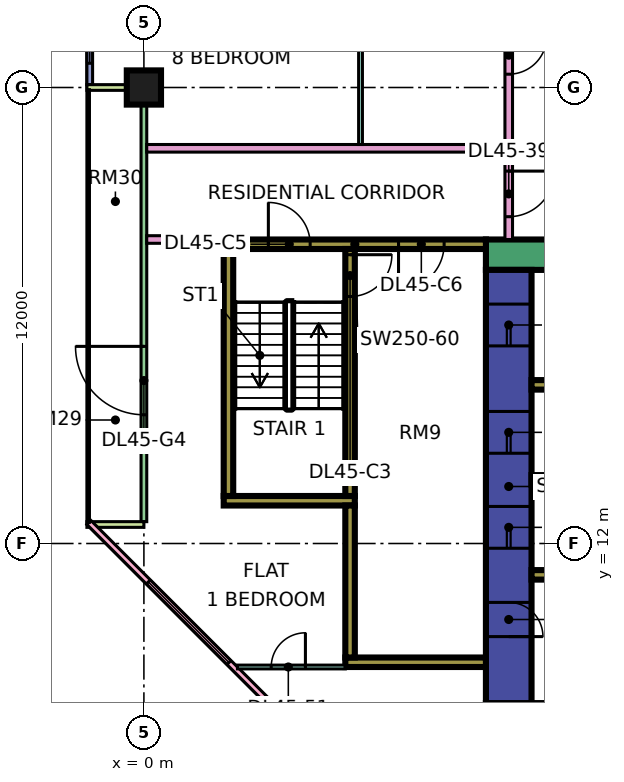
"""IFC4 building model, lengths in metres.
Left out: names, types, materials, properties, quantities, classifications, styles, units other than length and angle.
Written with IfcOpenShell. Run it as: python <this file> out.ifc"""

import sys

from ifc_helpers import new_model, si_unit, direction, frame, frame_2d, origin, origin_2d, place, context, subcontext, project, spatial, rectangle, extrude, element, fill, save


model = new_model("IFC4")
c1 = context("Model", 3, precision=1e-05, world=origin(), true_north=direction((0.0, 1.0)))
c2 = subcontext(c1, "Body", "Model", "MODEL_VIEW")
j1 = project(units=[si_unit("LENGTHUNIT", "METRE"), si_unit("PLANEANGLEUNIT", "RADIAN")], contexts=[c1])
p1 = place(None, origin())
s1 = spatial("IfcSite", under=j1, at=p1, CompositionType="ELEMENT")
p2 = place(p1, origin())
s2 = spatial("IfcBuilding", under=s1, at=p2, CompositionType="ELEMENT")
p3 = place(p2, frame((0.0, 0.0, 194.9)))
s3 = spatial("IfcBuildingStorey", under=s2, at=p3, CompositionType="ELEMENT", Elevation=194.9)
p4 = place(p3, frame((0.0, 24.0, 0.0), z_axis=(0.0, 0.0, 1.0), x_axis=(1.0, 0.0, 0.0)))
e1 = element("IfcColumn", 1, at=p4, inside=s3, PredefinedType="COLUMN", context=c2, shape_type="SweptSolid", body=[
    extrude(rectangle(XDim=0.9, YDim=0.9, at=origin_2d()), origin(), (0.0, 0.0, 1.0), 3.75),
])
p5 = place(p3, frame((9.0, 19.6, 0.0), z_axis=(0.0, 0.0, 1.0), x_axis=(1.0, 0.0, 0.0)))
e2 = element("IfcWall", 2, at=p5, inside=s3, PredefinedType="SHEAR", context=c2, shape_type="SweptSolid", body=[
    extrude(rectangle(XDim=25.0, YDim=0.8, at=frame_2d((12.5, 0.0))), origin(), (0.0, 0.0, 1.0), 3.75),
])
p6 = place(p5, frame((19.1, 0.0, 0.0)))
e3 = element("IfcOpeningElement", 3, at=p6, cuts=e2, PredefinedType="OPENING", context=c2, shape_type="SweptSolid", body=[
    extrude(rectangle(XDim=1.8, YDim=2.4, at=frame_2d((0.9, 1.2))), frame((0.0, 0.41, 0.0), z_axis=(0.0, -1.0, 0.0), x_axis=(1.0, 0.0, 0.0)), (0.0, 0.0, 1.0), 0.82),
])
p7 = place(p3, frame((9.6, 7.8, 0.0), z_axis=(0.0, 0.0, 1.0), x_axis=(0.0, 1.0, 0.0)))
e4 = element("IfcWall", 4, at=p7, inside=s3, PredefinedType="SHEAR", context=c2, shape_type="SweptSolid", body=[
    extrude(rectangle(XDim=11.4, YDim=1.2, at=frame_2d((5.7, 0.0))), origin(), (0.0, 0.0, 1.0), 3.75),
])
p8 = place(p7, frame((4.075, 0.0, 0.0)))
e5 = element("IfcOpeningElement", 5, at=p8, cuts=e4, PredefinedType="OPENING", context=c2, shape_type="SweptSolid", body=[
    extrude(rectangle(XDim=1.1, YDim=2.2, at=frame_2d((0.55, 1.1))), frame((0.0, 0.61, 0.0), z_axis=(0.0, -1.0, 0.0), x_axis=(1.0, 0.0, 0.0)), (0.0, 0.0, 1.0), 1.22),
])
p9 = place(p7, frame((6.575, 0.0, 0.0)))
e6 = element("IfcOpeningElement", 6, at=p9, cuts=e4, PredefinedType="OPENING", context=c2, shape_type="SweptSolid", body=[
    extrude(rectangle(XDim=1.1, YDim=2.2, at=frame_2d((0.55, 1.1))), frame((0.0, 0.61, 0.0), z_axis=(0.0, -1.0, 0.0), x_axis=(1.0, 0.0, 0.0)), (0.0, 0.0, 1.0), 1.22),
])
p10 = place(p7, frame((9.4, 0.0, 0.0)))
e7 = element("IfcOpeningElement", 7, at=p10, cuts=e4, PredefinedType="OPENING", context=c2, shape_type="SweptSolid", body=[
    extrude(rectangle(XDim=1.1, YDim=2.2, at=frame_2d((0.55, 1.1))), frame((0.0, 0.61, 0.0), z_axis=(0.0, -1.0, 0.0), x_axis=(1.0, 0.0, 0.0)), (0.0, 0.0, 1.0), 1.22),
])
p11 = place(p7, frame((1.75, 0.0, 0.0)))
e8 = element("IfcOpeningElement", 8, at=p11, cuts=e4, PredefinedType="OPENING", context=c2, shape_type="SweptSolid", body=[
    extrude(rectangle(XDim=0.9, YDim=2.1, at=frame_2d((0.45, 1.05))), frame((0.0, 0.61, 0.0), z_axis=(0.0, -1.0, 0.0), x_axis=(1.0, 0.0, 0.0)), (0.0, 0.0, 1.0), 1.22),
])
for number, where, z_axis, x_axis in (
    (9, (10.2, 11.175, 0.0), (0.0, 0.0, 1.0), (1.0, 0.0, 0.0)),
    (10, (10.2, 13.675, 0.0), (0.0, 0.0, 1.0), (1.0, 0.0, 0.0)),
    (11, (10.2, 16.175, 0.0), (0.0, 0.0, 1.0), (1.0, 0.0, 0.0)),
):
    element("IfcWall", number, at=place(p3, frame(where, z_axis=z_axis, x_axis=x_axis)), inside=s3, PredefinedType="SHEAR", context=c2, shape_type="SweptSolid", body=[
        extrude(rectangle(XDim=3.0, YDim=0.25, at=frame_2d((1.5, 0.0))), origin(), (0.0, 0.0, 1.0), 3.75),
    ])
p12 = place(p3, frame((2.1, 19.875, 0.0), z_axis=(0.0, 0.0, 1.0), x_axis=(1.0, 0.0, 0.0)))
e12 = element("IfcWall", 12, at=p12, inside=s3, PredefinedType="SHEAR", context=c2, shape_type="SweptSolid", body=[
    extrude(rectangle(XDim=6.9, YDim=0.25, at=frame_2d((3.45, 0.0))), origin(), (0.0, 0.0, 1.0), 3.75),
])
p13 = place(p12, frame((1.175, 0.0, 0.0)))
e13 = element("IfcOpeningElement", 13, at=p13, cuts=e12, PredefinedType="OPENING", context=c2, shape_type="SweptSolid", body=[
    extrude(rectangle(XDim=1.1, YDim=2.2, at=frame_2d((0.55, 1.1))), frame((0.0, 0.135, 0.0), z_axis=(0.0, -1.0, 0.0), x_axis=(1.0, 0.0, 0.0)), (0.0, 0.0, 1.0), 0.27),
])
p14 = place(p12, frame((4.6, 0.0, 0.0)))
e14 = element("IfcOpeningElement", 14, at=p14, cuts=e12, PredefinedType="OPENING", context=c2, shape_type="SweptSolid", body=[
    extrude(rectangle(XDim=1.2, YDim=2.2, at=frame_2d((0.6, 1.1))), frame((0.0, 0.135, 0.0), z_axis=(0.0, -1.0, 0.0), x_axis=(1.0, 0.0, 0.0)), (0.0, 0.0, 1.0), 0.27),
])
p15 = place(p3, frame((2.1, 13.125, 0.0), z_axis=(0.0, 0.0, 1.0), x_axis=(1.0, 0.0, 0.0)))
e15 = element("IfcWall", 15, at=p15, inside=s3, PredefinedType="SHEAR", context=c2, shape_type="SweptSolid", body=[
    extrude(rectangle(XDim=3.45, YDim=0.25, at=frame_2d((1.725, 0.0))), origin(), (0.0, 0.0, 1.0), 3.75),
])
p16 = place(p3, frame((2.225, 13.25, 0.0), z_axis=(0.0, 0.0, 1.0), x_axis=(0.0, 1.0, 0.0)))
e16 = element("IfcWall", 16, at=p16, inside=s3, PredefinedType="SHEAR", context=c2, shape_type="SweptSolid", body=[
    extrude(rectangle(XDim=6.5, YDim=0.25, at=frame_2d((3.25, 0.0))), origin(), (0.0, 0.0, 1.0), 3.75),
])
p17 = place(p3, frame((5.425, 13.25, 0.0), z_axis=(0.0, 0.0, 1.0), x_axis=(0.0, 1.0, 0.0)))
e17 = element("IfcWall", 17, at=p17, inside=s3, PredefinedType="SHEAR", context=c2, shape_type="SweptSolid", body=[
    extrude(rectangle(XDim=6.5, YDim=0.25, at=frame_2d((3.25, 0.0))), origin(), (0.0, 0.0, 1.0), 3.75),
])
p18 = place(p17, frame((5.25, 0.0, 0.0)))
e18 = element("IfcOpeningElement", 18, at=p18, cuts=e17, PredefinedType="OPENING", context=c2, shape_type="SweptSolid", body=[
    extrude(rectangle(XDim=1.1, YDim=2.2, at=frame_2d((0.55, 1.1))), frame((0.0, 0.135, 0.0), z_axis=(0.0, -1.0, 0.0), x_axis=(1.0, 0.0, 0.0)), (0.0, 0.0, 1.0), 0.27),
])
p19 = place(p3, frame((5.3, 8.875, 0.0), z_axis=(0.0, 0.0, 1.0), x_axis=(1.0, 0.0, 0.0)))
e19 = element("IfcWall", 19, at=p19, inside=s3, PredefinedType="SHEAR", context=c2, shape_type="SweptSolid", body=[
    extrude(rectangle(XDim=3.7, YDim=0.25, at=frame_2d((1.85, 0.0))), origin(), (0.0, 0.0, 1.0), 3.75),
])
p20 = place(p3, frame((5.425, 9.0, 0.0), z_axis=(0.0, 0.0, 1.0), x_axis=(0.0, 1.0, 0.0)))
e20 = element("IfcWall", 20, at=p20, inside=s3, PredefinedType="SHEAR", context=c2, shape_type="SweptSolid", body=[
    extrude(rectangle(XDim=4.0, YDim=0.25, at=frame_2d((2.0, 0.0))), origin(), (0.0, 0.0, 1.0), 3.75),
])
p21 = place(p3, frame((-1.425, 35.925, 0.0), z_axis=(0.0, 0.0, 1.0), x_axis=(0.0, -1.0, 0.0)))
e21 = element("IfcWall", 21, at=p21, inside=s3, PredefinedType="SOLIDWALL", context=c2, shape_type="SweptSolid", body=[
    extrude(rectangle(XDim=11.85, YDim=0.15, at=frame_2d((5.925, 0.0))), origin(), (0.0, 0.0, 1.0), 3.35),
])
p22 = place(p21, frame((0.562, 0.0, 0.45)))
e22 = element("IfcOpeningElement", 22, at=p22, cuts=e21, PredefinedType="OPENING", context=c2, shape_type="SweptSolid", body=[
    extrude(rectangle(XDim=1.8, YDim=2.4, at=frame_2d((0.9, 1.2))), frame((0.0, 0.085, 0.0), z_axis=(0.0, -1.0, 0.0), x_axis=(1.0, 0.0, 0.0)), (0.0, 0.0, 1.0), 0.17),
])
p23 = place(p21, frame((3.525, 0.0, 0.45)))
e23 = element("IfcOpeningElement", 23, at=p23, cuts=e21, PredefinedType="OPENING", context=c2, shape_type="SweptSolid", body=[
    extrude(rectangle(XDim=4.8, YDim=2.4, at=frame_2d((2.4, 1.2))), frame((0.0, 0.085, 0.0), z_axis=(0.0, -1.0, 0.0), x_axis=(1.0, 0.0, 0.0)), (0.0, 0.0, 1.0), 0.17),
])
p24 = place(p21, frame((9.488, 0.0, 0.45)))
e24 = element("IfcOpeningElement", 24, at=p24, cuts=e21, PredefinedType="OPENING", context=c2, shape_type="SweptSolid", body=[
    extrude(rectangle(XDim=1.8, YDim=2.4, at=frame_2d((0.9, 1.2))), frame((0.0, 0.085, 0.0), z_axis=(0.0, -1.0, 0.0), x_axis=(1.0, 0.0, 0.0)), (0.0, 0.0, 1.0), 0.17),
])
p25 = place(p3, frame((0.0, 23.925, 0.0), z_axis=(0.0, 0.0, 1.0), x_axis=(0.0, -1.0, 0.0)))
e25 = element("IfcWall", 25, at=p25, inside=s3, PredefinedType="SOLIDWALL", context=c2, shape_type="SweptSolid", body=[
    extrude(rectangle(XDim=11.35, YDim=0.15, at=frame_2d((5.675, 0.0))), origin(), (0.0, 0.0, 1.0), 3.35),
])
p26 = place(p25, frame((6.738, 0.0, 0.0)))
e26 = element("IfcOpeningElement", 26, at=p26, cuts=e25, PredefinedType="OPENING", context=c2, shape_type="SweptSolid", body=[
    extrude(rectangle(XDim=1.8, YDim=2.4, at=frame_2d((0.9, 1.2))), frame((0.0, 0.085, 0.0), z_axis=(0.0, -1.0, 0.0), x_axis=(1.0, 0.0, 0.0)), (0.0, 0.0, 1.0), 0.17),
])
for number, where, z_axis, x_axis in (
    (27, (-1.5, 24.0, 0.0), (0.0, 0.0, 1.0), (1.0, 0.0, 0.0)),
    (28, (-1.5, 12.5, 0.0), (0.0, 0.0, 1.0), (1.0, 0.0, 0.0)),
):
    element("IfcWall", number, at=place(p3, frame(where, z_axis=z_axis, x_axis=x_axis)), inside=s3, PredefinedType="SOLIDWALL", context=c2, shape_type="SweptSolid", body=[
        extrude(rectangle(XDim=1.5, YDim=0.15, at=frame_2d((0.75, 0.0))), origin(), (0.0, 0.0, 1.0), 3.35),
    ])
p27 = place(p3, frame((-1.447, 12.553, 0.0), z_axis=(0.0, 0.0, 1.0), x_axis=(0.707106781187, -0.707106781187, 0.0)))
e29 = element("IfcWall", 29, at=p27, inside=s3, PredefinedType="SOLIDWALL", context=c2, shape_type="SweptSolid", body=[
    extrude(rectangle(XDim=19.799, YDim=0.15, at=frame_2d((9.899, 0.0))), origin(), (0.0, 0.0, 1.0), 3.35),
])
p28 = place(p27, frame((2.212, 0.0, 0.45)))
e30 = element("IfcOpeningElement", 30, at=p28, cuts=e29, PredefinedType="OPENING", context=c2, shape_type="SweptSolid", body=[
    extrude(rectangle(XDim=3.0, YDim=2.4, at=frame_2d((1.5, 1.2))), frame((0.0, 0.085, 0.0), z_axis=(0.0, -1.0, 0.0), x_axis=(1.0, 0.0, 0.0)), (0.0, 0.0, 1.0), 0.17),
])
p29 = place(p27, frame((10.216, 0.0, 0.45)))
e31 = element("IfcOpeningElement", 31, at=p29, cuts=e29, PredefinedType="OPENING", context=c2, shape_type="SweptSolid", body=[
    extrude(rectangle(XDim=3.0, YDim=2.4, at=frame_2d((1.5, 1.2))), frame((0.0, 0.085, 0.0), z_axis=(0.0, -1.0, 0.0), x_axis=(1.0, 0.0, 0.0)), (0.0, 0.0, 1.0), 0.17),
])
p30 = place(p3, frame((0.074, 20.0, 0.0), z_axis=(0.0, 0.0, 1.0), x_axis=(1.0, 0.0, 0.0)))
e32 = element("IfcWall", 32, at=p30, inside=s3, PredefinedType="PARTITIONING", context=c2, shape_type="SweptSolid", body=[
    extrude(rectangle(XDim=2.026, YDim=0.2, at=frame_2d((1.013, 0.0))), origin(), (0.0, 0.0, 1.0), 3.35),
])
p31 = place(p3, frame((0.074, 22.4, 0.0), z_axis=(0.0, 0.0, 1.0), x_axis=(1.0, 0.0, 0.0)))
e33 = element("IfcWall", 33, at=p31, inside=s3, PredefinedType="PARTITIONING", context=c2, shape_type="SweptSolid", body=[
    extrude(rectangle(XDim=9.426, YDim=0.2, at=frame_2d((4.713, 0.0))), origin(), (0.0, 0.0, 1.0), 3.35),
])
p32 = place(p3, frame((2.461, 8.75, 0.0), z_axis=(0.0, 0.0, 1.0), x_axis=(1.0, 0.0, 0.0)))
e34 = element("IfcWall", 34, at=p32, inside=s3, PredefinedType="PARTITIONING", context=c2, shape_type="SweptSolid", body=[
    extrude(rectangle(XDim=2.839, YDim=0.1, at=frame_2d((1.419, 0.0))), origin(), (0.0, 0.0, 1.0), 3.35),
])
p33 = place(p32, frame((0.889, 0.0, 0.0)))
e35 = element("IfcOpeningElement", 35, at=p33, cuts=e34, PredefinedType="OPENING", context=c2, shape_type="SweptSolid", body=[
    extrude(rectangle(XDim=0.9, YDim=2.1, at=frame_2d((0.45, 1.05))), frame((0.0, 0.06, 0.0), z_axis=(0.0, -1.0, 0.0), x_axis=(1.0, 0.0, 0.0)), (0.0, 0.0, 1.0), 0.12),
])
p34 = place(p3, frame((5.7, 22.5, 0.0), z_axis=(0.0, 0.0, 1.0), x_axis=(0.0, 1.0, 0.0)))
e36 = element("IfcWall", 36, at=p34, inside=s3, PredefinedType="PARTITIONING", context=c2, shape_type="SweptSolid", body=[
    extrude(rectangle(XDim=4.45, YDim=0.1, at=frame_2d((2.225, 0.0))), origin(), (0.0, 0.0, 1.0), 3.35),
])
p35 = place(p3, frame((9.6, 20.0, 0.0), z_axis=(0.0, 0.0, 1.0), x_axis=(0.0, 1.0, 0.0)))
e37 = element("IfcWall", 37, at=p35, inside=s3, PredefinedType="PARTITIONING", context=c2, shape_type="SweptSolid", body=[
    extrude(rectangle(XDim=44.35, YDim=0.2, at=frame_2d((22.175, 0.0))), origin(), (0.0, 0.0, 1.0), 3.35),
])
p36 = place(p35, frame((17.1, 0.0, 0.0)))
e38 = element("IfcOpeningElement", 38, at=p36, cuts=e37, PredefinedType="OPENING", context=c2, shape_type="SweptSolid", body=[
    extrude(rectangle(XDim=1.0, YDim=2.1, at=frame_2d((0.5, 1.05))), frame((0.0, 0.11, 0.0), z_axis=(0.0, -1.0, 0.0), x_axis=(1.0, 0.0, 0.0)), (0.0, 0.0, 1.0), 0.22),
])
p37 = place(p35, frame((29.1, 0.0, 0.0)))
e39 = element("IfcOpeningElement", 39, at=p37, cuts=e37, PredefinedType="OPENING", context=c2, shape_type="SweptSolid", body=[
    extrude(rectangle(XDim=1.0, YDim=2.1, at=frame_2d((0.5, 1.05))), frame((0.0, 0.11, 0.0), z_axis=(0.0, -1.0, 0.0), x_axis=(1.0, 0.0, 0.0)), (0.0, 0.0, 1.0), 0.22),
])
p38 = place(p35, frame((0.6, 0.0, 0.0)))
e40 = element("IfcOpeningElement", 40, at=p38, cuts=e37, PredefinedType="OPENING", context=c2, shape_type="SweptSolid", body=[
    extrude(rectangle(XDim=1.2, YDim=2.1, at=frame_2d((0.6, 1.05))), frame((0.0, 0.11, 0.0), z_axis=(0.0, -1.0, 0.0), x_axis=(1.0, 0.0, 0.0)), (0.0, 0.0, 1.0), 0.22),
])
p39 = place(p35, frame((4.35, 0.0, 0.0)))
e41 = element("IfcOpeningElement", 41, at=p39, cuts=e37, PredefinedType="OPENING", context=c2, shape_type="SweptSolid", body=[
    extrude(rectangle(XDim=1.0, YDim=2.1, at=frame_2d((0.5, 1.05))), frame((0.0, 0.11, 0.0), z_axis=(0.0, -1.0, 0.0), x_axis=(1.0, 0.0, 0.0)), (0.0, 0.0, 1.0), 0.22),
])
p40 = place(p24, origin())
e42 = element("IfcWindow", 42, at=p40, inside=s3, PartitioningType="SINGLE_PANEL", PredefinedType="WINDOW", context=c2, shape_type="SweptSolid", body=[
    extrude(rectangle(XDim=1.8, YDim=2.4, at=frame_2d((0.9, 1.2))), frame((0.0, 0.03, 0.0), z_axis=(0.0, -1.0, 0.0), x_axis=(1.0, 0.0, 0.0)), (0.0, 0.0, 1.0), 0.06),
])
fill(e24, e42)
p41 = place(p26, frame((1.8, 0.0, 0.0), z_axis=(0.0, 0.0, 1.0), x_axis=(-1.0, 0.0, 0.0)))
e43 = element("IfcDoor", 43, at=p41, inside=s3, OperationType="DOUBLE_DOOR_SINGLE_SWING", PredefinedType="DOOR", context=c2, shape_type="SweptSolid", body=[
    extrude(rectangle(XDim=1.8, YDim=2.4, at=frame_2d((0.9, 1.2))), frame((0.0, 0.025, 0.0), z_axis=(0.0, -1.0, 0.0), x_axis=(1.0, 0.0, 0.0)), (0.0, 0.0, 1.0), 0.05),
])
fill(e26, e43)
p42 = place(p28, origin())
e44 = element("IfcWindow", 44, at=p42, inside=s3, PartitioningType="SINGLE_PANEL", PredefinedType="WINDOW", context=c2, shape_type="SweptSolid", body=[
    extrude(rectangle(XDim=3.0, YDim=2.4, at=frame_2d((1.5, 1.2))), frame((0.0, 0.03, 0.0), z_axis=(0.0, -1.0, 0.0), x_axis=(1.0, 0.0, 0.0)), (0.0, 0.0, 1.0), 0.06),
])
fill(e30, e44)
p43 = place(p8, origin())
e45 = element("IfcDoor", 45, at=p43, inside=s3, OperationType="DOUBLE_DOOR_SLIDING", PredefinedType="DOOR", context=c2, shape_type="SweptSolid", body=[
    extrude(rectangle(XDim=1.1, YDim=2.2, at=frame_2d((0.55, 1.1))), frame((0.0, 0.025, 0.0), z_axis=(0.0, -1.0, 0.0), x_axis=(1.0, 0.0, 0.0)), (0.0, 0.0, 1.0), 0.05),
])
fill(e5, e45)
p44 = place(p9, origin())
e46 = element("IfcDoor", 46, at=p44, inside=s3, OperationType="DOUBLE_DOOR_SLIDING", PredefinedType="DOOR", context=c2, shape_type="SweptSolid", body=[
    extrude(rectangle(XDim=1.1, YDim=2.2, at=frame_2d((0.55, 1.1))), frame((0.0, 0.025, 0.0), z_axis=(0.0, -1.0, 0.0), x_axis=(1.0, 0.0, 0.0)), (0.0, 0.0, 1.0), 0.05),
])
fill(e6, e46)
p45 = place(p10, origin())
e47 = element("IfcDoor", 47, at=p45, inside=s3, OperationType="DOUBLE_DOOR_SLIDING", PredefinedType="DOOR", context=c2, shape_type="SweptSolid", body=[
    extrude(rectangle(XDim=1.1, YDim=2.2, at=frame_2d((0.55, 1.1))), frame((0.0, 0.025, 0.0), z_axis=(0.0, -1.0, 0.0), x_axis=(1.0, 0.0, 0.0)), (0.0, 0.0, 1.0), 0.05),
])
fill(e7, e47)
p46 = place(p18, origin())
e48 = element("IfcDoor", 48, at=p46, inside=s3, OperationType="SINGLE_SWING_RIGHT", PredefinedType="DOOR", context=c2, shape_type="SweptSolid", body=[
    extrude(rectangle(XDim=1.1, YDim=2.2, at=frame_2d((0.55, 1.1))), frame((0.0, 0.025, 0.0), z_axis=(0.0, -1.0, 0.0), x_axis=(1.0, 0.0, 0.0)), (0.0, 0.0, 1.0), 0.05),
])
fill(e18, e48)
p47 = place(p11, frame((0.9, 0.0, 0.0), z_axis=(0.0, 0.0, 1.0), x_axis=(-1.0, 0.0, 0.0)))
e49 = element("IfcDoor", 49, at=p47, inside=s3, OperationType="SINGLE_SWING_LEFT", PredefinedType="DOOR", context=c2, shape_type="SweptSolid", body=[
    extrude(rectangle(XDim=0.9, YDim=2.1, at=frame_2d((0.45, 1.05))), frame((0.0, 0.025, 0.0), z_axis=(0.0, -1.0, 0.0), x_axis=(1.0, 0.0, 0.0)), (0.0, 0.0, 1.0), 0.05),
])
fill(e8, e49)
p48 = place(p13, origin())
e50 = element("IfcDoor", 50, at=p48, inside=s3, OperationType="SINGLE_SWING_LEFT", PredefinedType="DOOR", context=c2, shape_type="SweptSolid", body=[
    extrude(rectangle(XDim=1.1, YDim=2.2, at=frame_2d((0.55, 1.1))), frame((0.0, 0.025, 0.0), z_axis=(0.0, -1.0, 0.0), x_axis=(1.0, 0.0, 0.0)), (0.0, 0.0, 1.0), 0.05),
])
fill(e13, e50)
p49 = place(p14, frame((1.2, 0.0, 0.0), z_axis=(0.0, 0.0, 1.0), x_axis=(-1.0, 0.0, 0.0)))
e51 = element("IfcDoor", 51, at=p49, inside=s3, OperationType="SINGLE_SWING_LEFT", PredefinedType="DOOR", context=c2, shape_type="SweptSolid", body=[
    extrude(rectangle(XDim=1.2, YDim=2.2, at=frame_2d((0.6, 1.1))), frame((0.0, 0.025, 0.0), z_axis=(0.0, -1.0, 0.0), x_axis=(1.0, 0.0, 0.0)), (0.0, 0.0, 1.0), 0.05),
])
fill(e14, e51)
p50 = place(p38, origin())
e52 = element("IfcDoor", 52, at=p50, inside=s3, OperationType="SINGLE_SWING_RIGHT", PredefinedType="DOOR", context=c2, shape_type="SweptSolid", body=[
    extrude(rectangle(XDim=1.2, YDim=2.1, at=frame_2d((0.6, 1.05))), frame((0.0, 0.025, 0.0), z_axis=(0.0, -1.0, 0.0), x_axis=(1.0, 0.0, 0.0)), (0.0, 0.0, 1.0), 0.05),
])
fill(e40, e52)
p51 = place(p33, frame((0.9, 0.0, 0.0), z_axis=(0.0, 0.0, 1.0), x_axis=(-1.0, 0.0, 0.0)))
e53 = element("IfcDoor", 53, at=p51, inside=s3, OperationType="SINGLE_SWING_RIGHT", PredefinedType="DOOR", context=c2, shape_type="SweptSolid", body=[
    extrude(rectangle(XDim=0.9, YDim=2.1, at=frame_2d((0.45, 1.05))), frame((0.0, 0.025, 0.0), z_axis=(0.0, -1.0, 0.0), x_axis=(1.0, 0.0, 0.0)), (0.0, 0.0, 1.0), 0.05),
])
fill(e35, e53)
p52 = place(p39, origin())
e54 = element("IfcDoor", 54, at=p52, inside=s3, OperationType="SINGLE_SWING_RIGHT", PredefinedType="DOOR", context=c2, shape_type="SweptSolid", body=[
    extrude(rectangle(XDim=1.0, YDim=2.1, at=frame_2d((0.5, 1.05))), frame((0.0, 0.025, 0.0), z_axis=(0.0, -1.0, 0.0), x_axis=(1.0, 0.0, 0.0)), (0.0, 0.0, 1.0), 0.05),
])
fill(e41, e54)
save(model, sys.argv[1])
